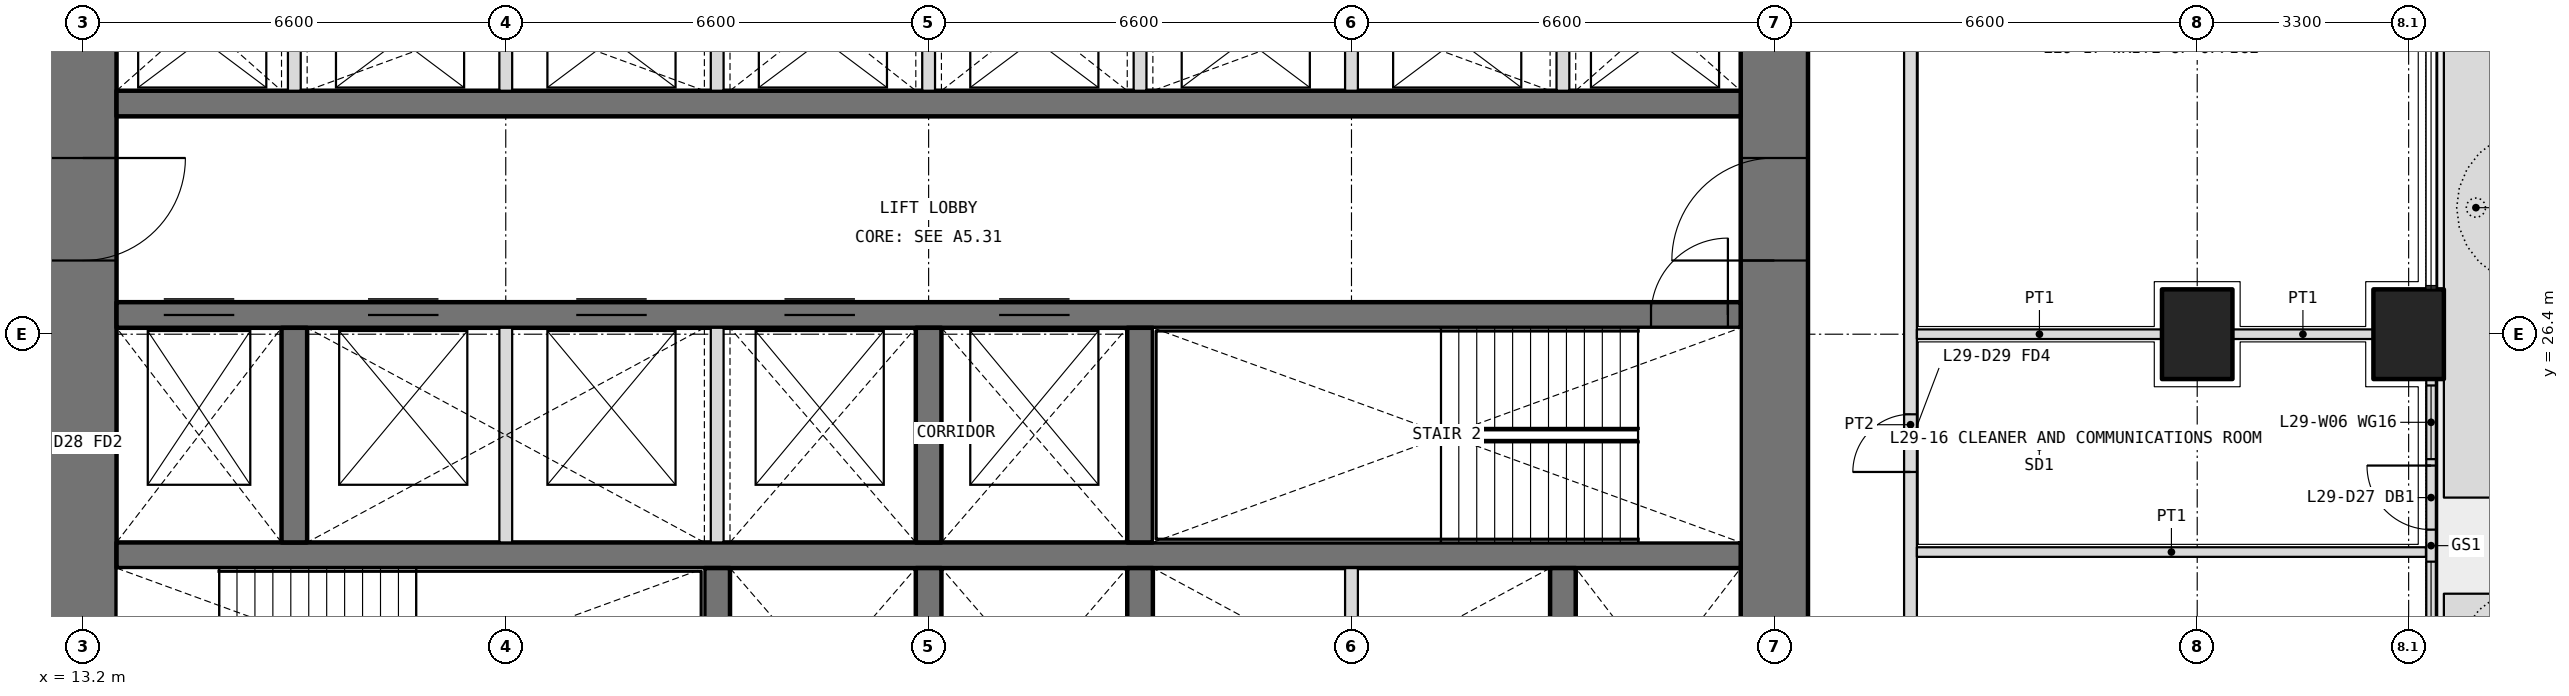
"""IFC4 building model, lengths in metres.
Left out: names, types, materials, properties, quantities, classifications, styles, units other than length and angle.
Written with IfcOpenShell. Run it as: python <this file> out.ifc"""

import sys

from ifc_helpers import new_model, si_unit, direction, frame, frame_2d, origin, origin_2d, place, context, subcontext, project, spatial, polyline, rectangle, outline, extrude, element, fill, save


model = new_model("IFC4")
c1 = context("Model", 3, precision=1e-05, world=origin(), true_north=direction((0.0, 1.0)))
c2 = subcontext(c1, "Body", "Model", "MODEL_VIEW")
j1 = project(units=[si_unit("LENGTHUNIT", "METRE"), si_unit("PLANEANGLEUNIT", "RADIAN")], contexts=[c1])
p1 = place(None, origin())
s1 = spatial("IfcSite", under=j1, at=p1, CompositionType="ELEMENT")
p2 = place(p1, origin())
s2 = spatial("IfcBuilding", under=s1, at=p2, CompositionType="ELEMENT")
p3 = place(p2, frame((0.0, 0.0, 128.4)))
s3 = spatial("IfcBuildingStorey", under=s2, at=p3, CompositionType="ELEMENT", Elevation=128.4)
for number, where, z_axis, x_axis in (
    (1, (49.5, 26.4, 0.0), (0.0, 0.0, 1.0), (0.0, 1.0, 0.0)),
    (2, (46.2, 26.4, 0.0), (0.0, 0.0, 1.0), (0.0, 1.0, 0.0)),
):
    element("IfcColumn", number, at=place(p3, frame(where, z_axis=z_axis, x_axis=x_axis)), inside=s3, PredefinedType="COLUMN", context=c2, shape_type="SweptSolid", body=[
        extrude(rectangle(XDim=1.4, YDim=1.1, at=origin_2d()), origin(), (0.0, 0.0, 1.0), 4.2),
    ])
p4 = place(p3, origin())
e3 = element("IfcWall", 3, at=p4, inside=s3, PredefinedType="USERDEFINED", context=c2, shape_type="SweptSolid", body=[
    extrude(outline(polyline([(50.05, 19.9), (51.05, 19.9), (51.05, 22.35), (50.05, 22.35), (50.05, 19.9)]), holes=[polyline([(50.2, 20.05), (50.9, 20.05), (50.9, 22.2), (50.2, 22.2), (50.2, 20.05)])]), origin(), (0.0, 0.0, 1.0), 1.05),
])
p5 = place(p3, origin())
e4 = element("IfcWall", 4, at=p5, inside=s3, PredefinedType="USERDEFINED", context=c2, shape_type="SweptSolid", body=[
    extrude(outline(polyline([(50.05, 23.85), (51.05, 23.85), (51.05, 32.9), (50.05, 32.9), (50.05, 23.85)]), holes=[polyline([(50.2, 24.0), (50.9, 24.0), (50.9, 32.75), (50.2, 32.75), (50.2, 24.0)])]), origin(), (0.0, 0.0, 1.0), 1.05),
])
p6 = place(p3, frame((49.85, 20.5, 0.0), z_axis=(0.0, 0.0, 1.0), x_axis=(0.0, 1.0, 0.0)))
e5 = element("IfcWall", 5, at=p6, inside=s3, PredefinedType="SOLIDWALL", context=c2, shape_type="SweptSolid", body=[
    extrude(rectangle(XDim=5.2, YDim=0.15, at=frame_2d((2.6, 0.0))), origin(), (0.0, 0.0, 1.0), 2.7),
])
p7 = place(p6, frame((2.85, 0.0, 0.0)))
e6 = element("IfcOpeningElement", 6, at=p7, cuts=e5, PredefinedType="OPENING", context=c2, shape_type="SweptSolid", body=[
    extrude(rectangle(XDim=1.0, YDim=2.4, at=frame_2d((0.5, 1.2))), frame((0.0, 0.085, 0.0), z_axis=(0.0, -1.0, 0.0), x_axis=(1.0, 0.0, 0.0)), (0.0, 0.0, 1.0), 0.17),
])
p8 = place(p6, frame((0.1, 0.0, 0.1)))
e7 = element("IfcOpeningElement", 7, at=p8, cuts=e5, PredefinedType="OPENING", context=c2, shape_type="SweptSolid", body=[
    extrude(rectangle(XDim=2.25, YDim=2.3, at=frame_2d((1.125, 1.15))), frame((0.0, 0.085, 0.0), z_axis=(0.0, -1.0, 0.0), x_axis=(1.0, 0.0, 0.0)), (0.0, 0.0, 1.0), 0.17),
])
p9 = place(p6, frame((3.95, 0.0, 0.1)))
e8 = element("IfcOpeningElement", 8, at=p9, cuts=e5, PredefinedType="OPENING", context=c2, shape_type="SweptSolid", body=[
    extrude(rectangle(XDim=1.15, YDim=2.3, at=frame_2d((0.575, 1.15))), frame((0.0, 0.085, 0.0), z_axis=(0.0, -1.0, 0.0), x_axis=(1.0, 0.0, 0.0)), (0.0, 0.0, 1.0), 0.17),
])
p10 = place(p3, frame((39.6, 13.725, 0.0), z_axis=(0.0, 0.0, 1.0), x_axis=(0.0, 1.0, 0.0)))
e9 = element("IfcWall", 9, at=p10, inside=s3, PredefinedType="SHEAR", context=c2, shape_type="SweptSolid", body=[
    extrude(rectangle(XDim=18.75, YDim=1.05, at=frame_2d((9.375, 0.0))), origin(), (0.0, 0.0, 1.0), 4.2),
])
p11 = place(p10, frame((3.025, 0.0, 0.0)))
e10 = element("IfcOpeningElement", 10, at=p11, cuts=e9, PredefinedType="OPENING", context=c2, shape_type="SweptSolid", body=[
    extrude(rectangle(XDim=1.6, YDim=2.1, at=frame_2d((0.8, 1.05))), frame((0.0, 0.535, 0.0), z_axis=(0.0, -1.0, 0.0), x_axis=(1.0, 0.0, 0.0)), (0.0, 0.0, 1.0), 1.07),
])
p12 = place(p10, frame((13.825, 0.0, 0.0)))
e11 = element("IfcOpeningElement", 11, at=p12, cuts=e9, PredefinedType="OPENING", context=c2, shape_type="SweptSolid", body=[
    extrude(rectangle(XDim=1.6, YDim=2.1, at=frame_2d((0.8, 1.05))), frame((0.0, 0.535, 0.0), z_axis=(0.0, -1.0, 0.0), x_axis=(1.0, 0.0, 0.0)), (0.0, 0.0, 1.0), 1.07),
])
p13 = place(p3, frame((13.2, 32.475, 0.0), z_axis=(0.0, 0.0, 1.0), x_axis=(0.0, -1.0, 0.0)))
e12 = element("IfcWall", 12, at=p13, inside=s3, PredefinedType="SHEAR", context=c2, shape_type="SweptSolid", body=[
    extrude(rectangle(XDim=18.75, YDim=1.05, at=frame_2d((9.375, 0.0))), origin(), (0.0, 0.0, 1.0), 4.2),
])
p14 = place(p13, frame((14.125, 0.0, 0.0)))
e13 = element("IfcOpeningElement", 13, at=p14, cuts=e12, PredefinedType="OPENING", context=c2, shape_type="SweptSolid", body=[
    extrude(rectangle(XDim=1.6, YDim=2.1, at=frame_2d((0.8, 1.05))), frame((0.0, 0.535, 0.0), z_axis=(0.0, -1.0, 0.0), x_axis=(1.0, 0.0, 0.0)), (0.0, 0.0, 1.0), 1.07),
])
p15 = place(p13, frame((3.325, 0.0, 0.0)))
e14 = element("IfcOpeningElement", 14, at=p15, cuts=e12, PredefinedType="OPENING", context=c2, shape_type="SweptSolid", body=[
    extrude(rectangle(XDim=1.6, YDim=2.1, at=frame_2d((0.8, 1.05))), frame((0.0, 0.535, 0.0), z_axis=(0.0, -1.0, 0.0), x_axis=(1.0, 0.0, 0.0)), (0.0, 0.0, 1.0), 1.07),
])
p16 = place(p3, frame((13.725, 22.95, 0.0), z_axis=(0.0, 0.0, 1.0), x_axis=(1.0, 0.0, 0.0)))
e15 = element("IfcWall", 15, at=p16, inside=s3, PredefinedType="SHEAR", context=c2, shape_type="SweptSolid", body=[
    extrude(rectangle(XDim=25.35, YDim=0.4, at=frame_2d((12.675, 0.0))), origin(), (0.0, 0.0, 1.0), 4.2),
])
p17 = place(p3, frame((13.725, 26.7, 0.0), z_axis=(0.0, 0.0, 1.0), x_axis=(1.0, 0.0, 0.0)))
e16 = element("IfcWall", 16, at=p17, inside=s3, PredefinedType="SHEAR", context=c2, shape_type="SweptSolid", body=[
    extrude(rectangle(XDim=25.35, YDim=0.4, at=frame_2d((12.675, 0.0))), origin(), (0.0, 0.0, 1.0), 4.2),
])
p18 = place(p17, frame((23.95, 0.0, 0.0)))
e17 = element("IfcOpeningElement", 17, at=p18, cuts=e16, PredefinedType="OPENING", context=c2, shape_type="SweptSolid", body=[
    extrude(rectangle(XDim=1.2, YDim=2.1, at=frame_2d((0.6, 1.05))), frame((0.0, 0.21, 0.0), z_axis=(0.0, -1.0, 0.0), x_axis=(1.0, 0.0, 0.0)), (0.0, 0.0, 1.0), 0.42),
])
p19 = place(p17, frame((0.738, 0.0, 0.0)))
e18 = element("IfcOpeningElement", 18, at=p19, cuts=e16, PredefinedType="OPENING", context=c2, shape_type="SweptSolid", body=[
    extrude(rectangle(XDim=1.1, YDim=2.1, at=frame_2d((0.55, 1.05))), frame((0.0, 0.21, 0.0), z_axis=(0.0, -1.0, 0.0), x_axis=(1.0, 0.0, 0.0)), (0.0, 0.0, 1.0), 0.42),
])
p20 = place(p17, frame((3.925, 0.0, 0.0)))
e19 = element("IfcOpeningElement", 19, at=p20, cuts=e16, PredefinedType="OPENING", context=c2, shape_type="SweptSolid", body=[
    extrude(rectangle(XDim=1.1, YDim=2.1, at=frame_2d((0.55, 1.05))), frame((0.0, 0.21, 0.0), z_axis=(0.0, -1.0, 0.0), x_axis=(1.0, 0.0, 0.0)), (0.0, 0.0, 1.0), 0.42),
])
p21 = place(p17, frame((7.175, 0.0, 0.0)))
e20 = element("IfcOpeningElement", 20, at=p21, cuts=e16, PredefinedType="OPENING", context=c2, shape_type="SweptSolid", body=[
    extrude(rectangle(XDim=1.1, YDim=2.1, at=frame_2d((0.55, 1.05))), frame((0.0, 0.21, 0.0), z_axis=(0.0, -1.0, 0.0), x_axis=(1.0, 0.0, 0.0)), (0.0, 0.0, 1.0), 0.42),
])
p22 = place(p17, frame((10.425, 0.0, 0.0)))
e21 = element("IfcOpeningElement", 21, at=p22, cuts=e16, PredefinedType="OPENING", context=c2, shape_type="SweptSolid", body=[
    extrude(rectangle(XDim=1.1, YDim=2.1, at=frame_2d((0.55, 1.05))), frame((0.0, 0.21, 0.0), z_axis=(0.0, -1.0, 0.0), x_axis=(1.0, 0.0, 0.0)), (0.0, 0.0, 1.0), 0.42),
])
p23 = place(p17, frame((13.775, 0.0, 0.0)))
e22 = element("IfcOpeningElement", 22, at=p23, cuts=e16, PredefinedType="OPENING", context=c2, shape_type="SweptSolid", body=[
    extrude(rectangle(XDim=1.1, YDim=2.1, at=frame_2d((0.55, 1.05))), frame((0.0, 0.21, 0.0), z_axis=(0.0, -1.0, 0.0), x_axis=(1.0, 0.0, 0.0)), (0.0, 0.0, 1.0), 0.42),
])
p24 = place(p3, frame((13.725, 30.0, 0.0), z_axis=(0.0, 0.0, 1.0), x_axis=(1.0, 0.0, 0.0)))
e23 = element("IfcWall", 23, at=p24, inside=s3, PredefinedType="SHEAR", context=c2, shape_type="SweptSolid", body=[
    extrude(rectangle(XDim=25.35, YDim=0.4, at=frame_2d((12.675, 0.0))), origin(), (0.0, 0.0, 1.0), 4.2),
])
for number, where, z_axis, x_axis in (
    (24, (23.1, 19.4, 0.0), (0.0, 0.0, 1.0), (0.0, 1.0, 0.0)),
    (25, (26.4, 19.4, 0.0), (0.0, 0.0, 1.0), (0.0, 1.0, 0.0)),
    (26, (29.7, 19.4, 0.0), (0.0, 0.0, 1.0), (0.0, 1.0, 0.0)),
    (27, (36.3, 19.4, 0.0), (0.0, 0.0, 1.0), (0.0, 1.0, 0.0)),
    (28, (16.5, 23.15, 0.0), (0.0, 0.0, 1.0), (0.0, 1.0, 0.0)),
    (29, (26.4, 23.15, 0.0), (0.0, 0.0, 1.0), (0.0, 1.0, 0.0)),
    (30, (29.7, 23.15, 0.0), (0.0, 0.0, 1.0), (0.0, 1.0, 0.0)),
):
    element("IfcWall", number, at=place(p3, frame(where, z_axis=z_axis, x_axis=x_axis)), inside=s3, PredefinedType="SHEAR", context=c2, shape_type="SweptSolid", body=[
        extrude(rectangle(XDim=3.35, YDim=0.4, at=frame_2d((1.675, 0.0))), origin(), (0.0, 0.0, 1.0), 4.2),
    ])
for number, where, z_axis, x_axis in (
    (31, (16.5, 30.2, 0.0), (0.0, 0.0, 1.0), (0.0, 1.0, 0.0)),
    (32, (19.8, 30.2, 0.0), (0.0, 0.0, 1.0), (0.0, 1.0, 0.0)),
    (33, (23.1, 30.2, 0.0), (0.0, 0.0, 1.0), (0.0, 1.0, 0.0)),
    (34, (26.4, 30.2, 0.0), (0.0, 0.0, 1.0), (0.0, 1.0, 0.0)),
    (35, (29.7, 30.2, 0.0), (0.0, 0.0, 1.0), (0.0, 1.0, 0.0)),
    (36, (33.0, 30.2, 0.0), (0.0, 0.0, 1.0), (0.0, 1.0, 0.0)),
    (37, (36.3, 30.2, 0.0), (0.0, 0.0, 1.0), (0.0, 1.0, 0.0)),
):
    element("IfcWall", number, at=place(p3, frame(where, z_axis=z_axis, x_axis=x_axis)), inside=s3, PredefinedType="PARTITIONING", context=c2, shape_type="SweptSolid", body=[
        extrude(rectangle(XDim=2.275, YDim=0.2, at=frame_2d((1.138, 0.0))), origin(), (0.0, 0.0, 1.0), 4.2),
    ])
for number, where, z_axis, x_axis in (
    (38, (33.0, 19.4, 0.0), (0.0, 0.0, 1.0), (0.0, 1.0, 0.0)),
    (39, (19.8, 23.15, 0.0), (0.0, 0.0, 1.0), (0.0, 1.0, 0.0)),
    (40, (23.1, 23.15, 0.0), (0.0, 0.0, 1.0), (0.0, 1.0, 0.0)),
):
    element("IfcWall", number, at=place(p3, frame(where, z_axis=z_axis, x_axis=x_axis)), inside=s3, PredefinedType="PARTITIONING", context=c2, shape_type="SweptSolid", body=[
        extrude(rectangle(XDim=3.35, YDim=0.2, at=frame_2d((1.675, 0.0))), origin(), (0.0, 0.0, 1.0), 4.2),
    ])
p25 = place(p3, frame((41.725, 11.175, 0.0), z_axis=(0.0, 0.0, 1.0), x_axis=(0.0, 1.0, 0.0)))
e41 = element("IfcWall", 41, at=p25, inside=s3, PredefinedType="PARTITIONING", context=c2, shape_type="SweptSolid", body=[
    extrude(rectangle(XDim=27.625, YDim=0.2, at=frame_2d((13.812, 0.0))), origin(), (0.0, 0.0, 1.0), 2.85),
])
p26 = place(p25, frame((3.762, 0.0, 0.0)))
e42 = element("IfcOpeningElement", 42, at=p26, cuts=e41, PredefinedType="OPENING", context=c2, shape_type="SweptSolid", body=[
    extrude(rectangle(XDim=1.0, YDim=2.1, at=frame_2d((0.5, 1.05))), frame((0.0, 0.11, 0.0), z_axis=(0.0, -1.0, 0.0), x_axis=(1.0, 0.0, 0.0)), (0.0, 0.0, 1.0), 0.22),
])
p27 = place(p25, frame((9.725, 0.0, 0.0)))
e43 = element("IfcOpeningElement", 43, at=p27, cuts=e41, PredefinedType="OPENING", context=c2, shape_type="SweptSolid", body=[
    extrude(rectangle(XDim=1.0, YDim=2.1, at=frame_2d((0.5, 1.05))), frame((0.0, 0.11, 0.0), z_axis=(0.0, -1.0, 0.0), x_axis=(1.0, 0.0, 0.0)), (0.0, 0.0, 1.0), 0.22),
])
p28 = place(p25, frame((13.075, 0.0, 0.0)))
e44 = element("IfcOpeningElement", 44, at=p28, cuts=e41, PredefinedType="OPENING", context=c2, shape_type="SweptSolid", body=[
    extrude(rectangle(XDim=0.9, YDim=2.1, at=frame_2d((0.45, 1.05))), frame((0.0, 0.11, 0.0), z_axis=(0.0, -1.0, 0.0), x_axis=(1.0, 0.0, 0.0)), (0.0, 0.0, 1.0), 0.22),
])
p29 = place(p25, frame((19.675, 0.0, 0.0)))
e45 = element("IfcOpeningElement", 45, at=p29, cuts=e41, PredefinedType="OPENING", context=c2, shape_type="SweptSolid", body=[
    extrude(rectangle(XDim=1.0, YDim=2.1, at=frame_2d((0.5, 1.05))), frame((0.0, 0.11, 0.0), z_axis=(0.0, -1.0, 0.0), x_axis=(1.0, 0.0, 0.0)), (0.0, 0.0, 1.0), 0.22),
])
p30 = place(p25, frame((25.925, 0.0, 0.0)))
e46 = element("IfcOpeningElement", 46, at=p30, cuts=e41, PredefinedType="OPENING", context=c2, shape_type="SweptSolid", body=[
    extrude(rectangle(XDim=1.0, YDim=2.1, at=frame_2d((0.5, 1.05))), frame((0.0, 0.11, 0.0), z_axis=(0.0, -1.0, 0.0), x_axis=(1.0, 0.0, 0.0)), (0.0, 0.0, 1.0), 0.22),
])
p31 = place(p3, frame((49.77, 23.0, 0.0), z_axis=(0.0, 0.0, 1.0), x_axis=(-1.0, 0.0, 0.0)))
e47 = element("IfcWall", 47, at=p31, inside=s3, PredefinedType="PARTITIONING", context=c2, shape_type="SweptSolid", body=[
    extrude(rectangle(XDim=7.945, YDim=0.15, at=frame_2d((3.973, 0.0))), origin(), (0.0, 0.0, 1.0), 2.7),
])
p32 = place(p3, frame((48.95, 26.4, 0.0), z_axis=(0.0, 0.0, 1.0), x_axis=(-1.0, 0.0, 0.0)))
e48 = element("IfcWall", 48, at=p32, inside=s3, PredefinedType="PARTITIONING", context=c2, shape_type="SweptSolid", body=[
    extrude(rectangle(XDim=2.2, YDim=0.15, at=frame_2d((1.1, 0.0))), origin(), (0.0, 0.0, 1.0), 2.85),
])
p33 = place(p3, frame((45.65, 26.4, 0.0), z_axis=(0.0, 0.0, 1.0), x_axis=(-1.0, 0.0, 0.0)))
e49 = element("IfcWall", 49, at=p33, inside=s3, PredefinedType="PARTITIONING", context=c2, shape_type="SweptSolid", body=[
    extrude(rectangle(XDim=3.825, YDim=0.15, at=frame_2d((1.913, 0.0))), origin(), (0.0, 0.0, 1.0), 2.85),
])
p34 = place(p7, origin())
e50 = element("IfcDoor", 50, at=p34, inside=s3, OperationType="SINGLE_SWING_RIGHT", PredefinedType="DOOR", context=c2, shape_type="SweptSolid", body=[
    extrude(rectangle(XDim=1.0, YDim=2.4, at=frame_2d((0.5, 1.2))), frame((0.0, 0.025, 0.0), z_axis=(0.0, -1.0, 0.0), x_axis=(1.0, 0.0, 0.0)), (0.0, 0.0, 1.0), 0.05),
])
fill(e6, e50)
p35 = place(p8, origin())
e51 = element("IfcWindow", 51, at=p35, inside=s3, PartitioningType="SINGLE_PANEL", PredefinedType="WINDOW", context=c2, shape_type="SweptSolid", body=[
    extrude(rectangle(XDim=2.25, YDim=2.3, at=frame_2d((1.125, 1.15))), frame((0.0, 0.03, 0.0), z_axis=(0.0, -1.0, 0.0), x_axis=(1.0, 0.0, 0.0)), (0.0, 0.0, 1.0), 0.06),
])
fill(e7, e51)
p36 = place(p9, origin())
e52 = element("IfcWindow", 52, at=p36, inside=s3, PartitioningType="SINGLE_PANEL", PredefinedType="WINDOW", context=c2, shape_type="SweptSolid", body=[
    extrude(rectangle(XDim=1.15, YDim=2.3, at=frame_2d((0.575, 1.15))), frame((0.0, 0.03, 0.0), z_axis=(0.0, -1.0, 0.0), x_axis=(1.0, 0.0, 0.0)), (0.0, 0.0, 1.0), 0.06),
])
fill(e8, e52)
p37 = place(p28, origin())
e53 = element("IfcDoor", 53, at=p37, inside=s3, OperationType="SINGLE_SWING_LEFT", PredefinedType="DOOR", context=c2, shape_type="SweptSolid", body=[
    extrude(rectangle(XDim=0.9, YDim=2.1, at=frame_2d((0.45, 1.05))), frame((0.0, 0.025, 0.0), z_axis=(0.0, -1.0, 0.0), x_axis=(1.0, 0.0, 0.0)), (0.0, 0.0, 1.0), 0.05),
])
fill(e44, e53)
p38 = place(p18, origin())
e54 = element("IfcDoor", 54, at=p38, inside=s3, OperationType="SINGLE_SWING_RIGHT", PredefinedType="DOOR", context=c2, shape_type="SweptSolid", body=[
    extrude(rectangle(XDim=1.2, YDim=2.1, at=frame_2d((0.6, 1.05))), frame((0.0, 0.025, 0.0), z_axis=(0.0, -1.0, 0.0), x_axis=(1.0, 0.0, 0.0)), (0.0, 0.0, 1.0), 0.05),
])
fill(e17, e54)
p39 = place(p15, origin())
e55 = element("IfcDoor", 55, at=p39, inside=s3, OperationType="DOUBLE_DOOR_DOUBLE_SWING", PredefinedType="DOOR", context=c2, shape_type="SweptSolid", body=[
    extrude(rectangle(XDim=1.6, YDim=2.1, at=frame_2d((0.8, 1.05))), frame((0.0, 0.025, 0.0), z_axis=(0.0, -1.0, 0.0), x_axis=(1.0, 0.0, 0.0)), (0.0, 0.0, 1.0), 0.05),
])
fill(e14, e55)
p40 = place(p12, origin())
e56 = element("IfcDoor", 56, at=p40, inside=s3, OperationType="DOUBLE_DOOR_DOUBLE_SWING", PredefinedType="DOOR", context=c2, shape_type="SweptSolid", body=[
    extrude(rectangle(XDim=1.6, YDim=2.1, at=frame_2d((0.8, 1.05))), frame((0.0, 0.025, 0.0), z_axis=(0.0, -1.0, 0.0), x_axis=(1.0, 0.0, 0.0)), (0.0, 0.0, 1.0), 0.05),
])
fill(e11, e56)
p41 = place(p19, origin())
e57 = element("IfcDoor", 57, at=p41, inside=s3, OperationType="DOUBLE_DOOR_SLIDING", PredefinedType="DOOR", context=c2, shape_type="SweptSolid", body=[
    extrude(rectangle(XDim=1.1, YDim=2.1, at=frame_2d((0.55, 1.05))), frame((0.0, 0.025, 0.0), z_axis=(0.0, -1.0, 0.0), x_axis=(1.0, 0.0, 0.0)), (0.0, 0.0, 1.0), 0.05),
])
fill(e18, e57)
p42 = place(p20, origin())
e58 = element("IfcDoor", 58, at=p42, inside=s3, OperationType="DOUBLE_DOOR_SLIDING", PredefinedType="DOOR", context=c2, shape_type="SweptSolid", body=[
    extrude(rectangle(XDim=1.1, YDim=2.1, at=frame_2d((0.55, 1.05))), frame((0.0, 0.025, 0.0), z_axis=(0.0, -1.0, 0.0), x_axis=(1.0, 0.0, 0.0)), (0.0, 0.0, 1.0), 0.05),
])
fill(e19, e58)
p43 = place(p21, origin())
e59 = element("IfcDoor", 59, at=p43, inside=s3, OperationType="DOUBLE_DOOR_SLIDING", PredefinedType="DOOR", context=c2, shape_type="SweptSolid", body=[
    extrude(rectangle(XDim=1.1, YDim=2.1, at=frame_2d((0.55, 1.05))), frame((0.0, 0.025, 0.0), z_axis=(0.0, -1.0, 0.0), x_axis=(1.0, 0.0, 0.0)), (0.0, 0.0, 1.0), 0.05),
])
fill(e20, e59)
p44 = place(p22, origin())
e60 = element("IfcDoor", 60, at=p44, inside=s3, OperationType="DOUBLE_DOOR_SLIDING", PredefinedType="DOOR", context=c2, shape_type="SweptSolid", body=[
    extrude(rectangle(XDim=1.1, YDim=2.1, at=frame_2d((0.55, 1.05))), frame((0.0, 0.025, 0.0), z_axis=(0.0, -1.0, 0.0), x_axis=(1.0, 0.0, 0.0)), (0.0, 0.0, 1.0), 0.05),
])
fill(e21, e60)
p45 = place(p23, origin())
e61 = element("IfcDoor", 61, at=p45, inside=s3, OperationType="DOUBLE_DOOR_SLIDING", PredefinedType="DOOR", context=c2, shape_type="SweptSolid", body=[
    extrude(rectangle(XDim=1.1, YDim=2.1, at=frame_2d((0.55, 1.05))), frame((0.0, 0.025, 0.0), z_axis=(0.0, -1.0, 0.0), x_axis=(1.0, 0.0, 0.0)), (0.0, 0.0, 1.0), 0.05),
])
fill(e22, e61)
save(model, sys.argv[1])
